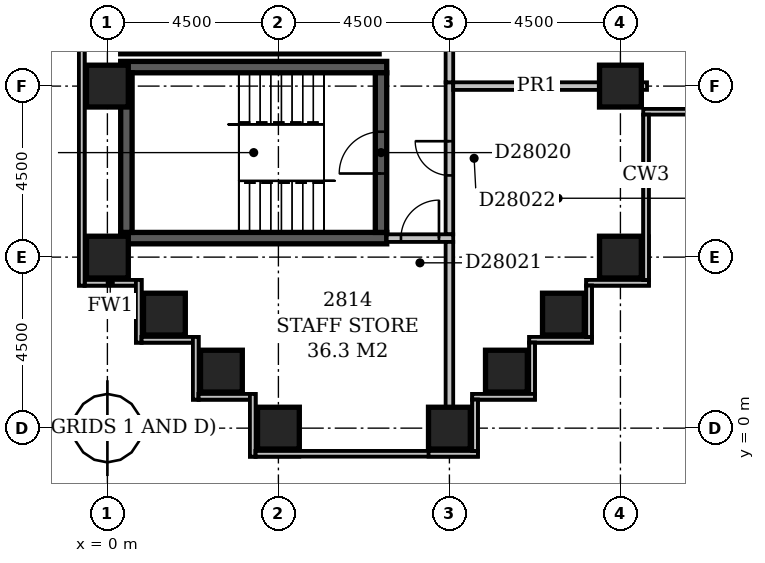
"""IFC4 building model, lengths in metres.
Left out: names, types, materials, properties, quantities, classifications, styles, units other than length and angle.
Written with IfcOpenShell. Run it as: python <this file> out.ifc"""

import sys

from ifc_helpers import new_model, si_unit, direction, frame, frame_2d, origin, origin_2d, place, context, subcontext, project, spatial, rectangle, extrude, element, fill, save


model = new_model("IFC4")
c1 = context("Model", 3, precision=1e-05, world=origin(), true_north=direction((0.0, 1.0)))
c2 = subcontext(c1, "Body", "Model", "MODEL_VIEW")
j1 = project(units=[si_unit("LENGTHUNIT", "METRE"), si_unit("PLANEANGLEUNIT", "RADIAN")], contexts=[c1])
p1 = place(None, origin())
s1 = spatial("IfcSite", under=j1, at=p1, CompositionType="ELEMENT")
p2 = place(p1, origin())
s2 = spatial("IfcBuilding", under=s1, at=p2, CompositionType="ELEMENT")
p3 = place(p2, frame((0.0, 0.0, 113.6)))
s3 = spatial("IfcBuildingStorey", under=s2, at=p3, CompositionType="ELEMENT", Elevation=113.6)
for number, where, z_axis, x_axis in (
    (1, (0.35, 5.0, -0.5), (0.0, 0.0, 1.0), (1.0, 0.0, 0.0)),
    (2, (0.35, 9.5, -0.5), (0.0, 0.0, 1.0), (1.0, 0.0, 0.0)),
):
    element("IfcWall", number, at=place(p3, frame(where, z_axis=z_axis, x_axis=x_axis)), inside=s3, PredefinedType="SHEAR", context=c2, shape_type="SweptSolid", body=[
        extrude(rectangle(XDim=7.0, YDim=0.3, at=frame_2d((3.5, 0.0))), origin(), (0.0, 0.0, 1.0), 6.2),
    ])
p4 = place(p3, frame((0.35, 10.0, -0.5), z_axis=(0.0, 0.0, 1.0), x_axis=(1.0, 0.0, 0.0)))
e3 = element("IfcWall", 3, at=p4, inside=s3, PredefinedType="SHEAR", context=c2, shape_type="SweptSolid", body=[
    extrude(rectangle(XDim=6.8, YDim=0.3, at=frame_2d((3.4, 0.0))), origin(), (0.0, 0.0, 1.0), 6.2),
])
p5 = place(p3, frame((0.5, 5.15, -0.5), z_axis=(0.0, 0.0, 1.0), x_axis=(0.0, 1.0, 0.0)))
e4 = element("IfcWall", 4, at=p5, inside=s3, PredefinedType="SHEAR", context=c2, shape_type="SweptSolid", body=[
    extrude(rectangle(XDim=4.2, YDim=0.3, at=frame_2d((2.1, 0.0))), origin(), (0.0, 0.0, 1.0), 6.2),
])
p6 = place(p3, frame((7.2, 5.15, -0.5), z_axis=(0.0, 0.0, 1.0), x_axis=(0.0, 1.0, 0.0)))
e5 = element("IfcWall", 5, at=p6, inside=s3, PredefinedType="SHEAR", context=c2, shape_type="SweptSolid", body=[
    extrude(rectangle(XDim=4.2, YDim=0.3, at=frame_2d((2.1, 0.0))), origin(), (0.0, 0.0, 1.0), 6.2),
])
p7 = place(p6, frame((1.55, 0.0, 0.5)))
e6 = element("IfcOpeningElement", 6, at=p7, cuts=e5, PredefinedType="OPENING", context=c2, shape_type="SweptSolid", body=[
    extrude(rectangle(XDim=1.1, YDim=2.1, at=frame_2d((0.55, 1.05))), frame((0.0, 0.162, 0.0), z_axis=(0.0, -1.0, 0.0), x_axis=(1.0, 0.0, 0.0)), (0.0, 0.0, 1.0), 0.324),
])
for number, where, z_axis, x_axis in (
    (7, (4.5, 0.0, -0.5), (0.0, 0.0, 1.0), (1.0, 0.0, 0.0)),
    (8, (9.0, 0.0, -0.5), (0.0, 0.0, 1.0), (1.0, 0.0, 0.0)),
    (9, (3.0, 1.5, -0.5), (0.0, 0.0, 1.0), (1.0, 0.0, 0.0)),
    (10, (10.5, 1.5, -0.5), (0.0, 0.0, 1.0), (1.0, 0.0, 0.0)),
    (11, (1.5, 3.0, -0.5), (0.0, 0.0, 1.0), (1.0, 0.0, 0.0)),
    (12, (12.0, 3.0, -0.5), (0.0, 0.0, 1.0), (1.0, 0.0, 0.0)),
    (13, (0.0, 4.5, -0.5), (0.0, 0.0, 1.0), (1.0, 0.0, 0.0)),
    (14, (13.5, 4.5, -0.5), (0.0, 0.0, 1.0), (1.0, 0.0, 0.0)),
    (15, (0.0, 9.0, -0.5), (0.0, 0.0, 1.0), (1.0, 0.0, 0.0)),
    (16, (13.5, 9.0, -0.5), (0.0, 0.0, 1.0), (1.0, 0.0, 0.0)),
):
    element("IfcColumn", number, at=place(p3, frame(where, z_axis=z_axis, x_axis=x_axis)), inside=s3, PredefinedType="COLUMN", context=c2, shape_type="SweptSolid", body=[
        extrude(rectangle(XDim=1.1, YDim=1.1, at=origin_2d()), origin(), (0.0, 0.0, 1.0), 6.2),
    ])
p8 = place(p3, frame((9.675, -0.6, 0.0), z_axis=(0.0, 0.0, 1.0), x_axis=(0.0, 1.0, 0.0)))
e17 = element("IfcWall", 17, at=p8, inside=s3, PredefinedType="STANDARD", context=c2, shape_type="SweptSolid", body=[
    extrude(rectangle(XDim=1.35, YDim=0.15, at=frame_2d((0.675, 0.0))), origin(), (0.0, 0.0, 1.0), 1.1),
])
p9 = place(p3, frame((9.6, 0.825, 0.0), z_axis=(0.0, 0.0, 1.0), x_axis=(1.0, 0.0, 0.0)))
e18 = element("IfcWall", 18, at=p9, inside=s3, PredefinedType="STANDARD", context=c2, shape_type="SweptSolid", body=[
    extrude(rectangle(XDim=1.65, YDim=0.15, at=frame_2d((0.825, 0.0))), origin(), (0.0, 0.0, 1.0), 1.1),
])
p10 = place(p3, frame((11.175, 0.9, 0.0), z_axis=(0.0, 0.0, 1.0), x_axis=(0.0, 1.0, 0.0)))
e19 = element("IfcWall", 19, at=p10, inside=s3, PredefinedType="STANDARD", context=c2, shape_type="SweptSolid", body=[
    extrude(rectangle(XDim=1.35, YDim=0.15, at=frame_2d((0.675, 0.0))), origin(), (0.0, 0.0, 1.0), 1.1),
])
p11 = place(p3, frame((11.1, 2.325, 0.0), z_axis=(0.0, 0.0, 1.0), x_axis=(1.0, 0.0, 0.0)))
e20 = element("IfcWall", 20, at=p11, inside=s3, PredefinedType="STANDARD", context=c2, shape_type="SweptSolid", body=[
    extrude(rectangle(XDim=1.65, YDim=0.15, at=frame_2d((0.825, 0.0))), origin(), (0.0, 0.0, 1.0), 1.1),
])
p12 = place(p3, frame((12.675, 2.4, 0.0), z_axis=(0.0, 0.0, 1.0), x_axis=(0.0, 1.0, 0.0)))
e21 = element("IfcWall", 21, at=p12, inside=s3, PredefinedType="STANDARD", context=c2, shape_type="SweptSolid", body=[
    extrude(rectangle(XDim=1.35, YDim=0.15, at=frame_2d((0.675, 0.0))), origin(), (0.0, 0.0, 1.0), 1.1),
])
p13 = place(p3, frame((12.6, 3.825, 0.0), z_axis=(0.0, 0.0, 1.0), x_axis=(1.0, 0.0, 0.0)))
e22 = element("IfcWall", 22, at=p13, inside=s3, PredefinedType="STANDARD", context=c2, shape_type="SweptSolid", body=[
    extrude(rectangle(XDim=1.65, YDim=0.15, at=frame_2d((0.825, 0.0))), origin(), (0.0, 0.0, 1.0), 1.1),
])
p14 = place(p3, frame((14.175, 3.9, 0.0), z_axis=(0.0, 0.0, 1.0), x_axis=(0.0, 1.0, 0.0)))
e23 = element("IfcWall", 23, at=p14, inside=s3, PredefinedType="STANDARD", context=c2, shape_type="SweptSolid", body=[
    extrude(rectangle(XDim=4.35, YDim=0.15, at=frame_2d((2.175, 0.0))), origin(), (0.0, 0.0, 1.0), 1.1),
])
p15 = place(p3, frame((14.1, 8.325, 0.0), z_axis=(0.0, 0.0, 1.0), x_axis=(1.0, 0.0, 0.0)))
e24 = element("IfcWall", 24, at=p15, inside=s3, PredefinedType="STANDARD", context=c2, shape_type="SweptSolid", body=[
    extrude(rectangle(XDim=4.65, YDim=0.15, at=frame_2d((2.325, 0.0))), origin(), (0.0, 0.0, 1.0), 1.1),
])
p16 = place(p3, frame((-0.675, 59.1, 0.0), z_axis=(0.0, 0.0, 1.0), x_axis=(0.0, -1.0, 0.0)))
e25 = element("IfcWall", 25, at=p16, inside=s3, PredefinedType="STANDARD", context=c2, shape_type="SweptSolid", body=[
    extrude(rectangle(XDim=55.35, YDim=0.15, at=frame_2d((27.675, 0.0))), origin(), (0.0, 0.0, 1.0), 1.1),
])
p17 = place(p3, frame((-0.6, 3.825, 0.0), z_axis=(0.0, 0.0, 1.0), x_axis=(1.0, 0.0, 0.0)))
e26 = element("IfcWall", 26, at=p17, inside=s3, PredefinedType="STANDARD", context=c2, shape_type="SweptSolid", body=[
    extrude(rectangle(XDim=1.35, YDim=0.15, at=frame_2d((0.675, 0.0))), origin(), (0.0, 0.0, 1.0), 1.1),
])
p18 = place(p3, frame((0.825, 3.9, 0.0), z_axis=(0.0, 0.0, 1.0), x_axis=(0.0, -1.0, 0.0)))
e27 = element("IfcWall", 27, at=p18, inside=s3, PredefinedType="STANDARD", context=c2, shape_type="SweptSolid", body=[
    extrude(rectangle(XDim=1.65, YDim=0.15, at=frame_2d((0.825, 0.0))), origin(), (0.0, 0.0, 1.0), 1.1),
])
p19 = place(p3, frame((0.9, 2.325, 0.0), z_axis=(0.0, 0.0, 1.0), x_axis=(1.0, 0.0, 0.0)))
e28 = element("IfcWall", 28, at=p19, inside=s3, PredefinedType="STANDARD", context=c2, shape_type="SweptSolid", body=[
    extrude(rectangle(XDim=1.35, YDim=0.15, at=frame_2d((0.675, 0.0))), origin(), (0.0, 0.0, 1.0), 1.1),
])
p20 = place(p3, frame((2.325, 2.4, 0.0), z_axis=(0.0, 0.0, 1.0), x_axis=(0.0, -1.0, 0.0)))
e29 = element("IfcWall", 29, at=p20, inside=s3, PredefinedType="STANDARD", context=c2, shape_type="SweptSolid", body=[
    extrude(rectangle(XDim=1.65, YDim=0.15, at=frame_2d((0.825, 0.0))), origin(), (0.0, 0.0, 1.0), 1.1),
])
p21 = place(p3, frame((2.4, 0.825, 0.0), z_axis=(0.0, 0.0, 1.0), x_axis=(1.0, 0.0, 0.0)))
e30 = element("IfcWall", 30, at=p21, inside=s3, PredefinedType="STANDARD", context=c2, shape_type="SweptSolid", body=[
    extrude(rectangle(XDim=1.35, YDim=0.15, at=frame_2d((0.675, 0.0))), origin(), (0.0, 0.0, 1.0), 1.1),
])
p22 = place(p3, frame((3.825, 0.9, 0.0), z_axis=(0.0, 0.0, 1.0), x_axis=(0.0, -1.0, 0.0)))
e31 = element("IfcWall", 31, at=p22, inside=s3, PredefinedType="STANDARD", context=c2, shape_type="SweptSolid", body=[
    extrude(rectangle(XDim=1.65, YDim=0.15, at=frame_2d((0.825, 0.0))), origin(), (0.0, 0.0, 1.0), 1.1),
])
p23 = place(p3, frame((3.9, -0.675, 0.0), z_axis=(0.0, 0.0, 1.0), x_axis=(1.0, 0.0, 0.0)))
e32 = element("IfcWall", 32, at=p23, inside=s3, PredefinedType="STANDARD", context=c2, shape_type="SweptSolid", body=[
    extrude(rectangle(XDim=5.85, YDim=0.15, at=frame_2d((2.925, 0.0))), origin(), (0.0, 0.0, 1.0), 1.1),
])
p24 = place(p3, frame((9.675, -0.6, 1.1), z_axis=(0.0, 0.0, 1.0), x_axis=(0.0, 1.0, 0.0)))
e33 = element("IfcWall", 33, at=p24, inside=s3, PredefinedType="STANDARD", context=c2, shape_type="SweptSolid", body=[
    extrude(rectangle(XDim=1.35, YDim=0.15, at=frame_2d((0.675, 0.0))), origin(), (0.0, 0.0, 1.0), 4.0),
])
p25 = place(p3, frame((9.6, 0.825, 1.1), z_axis=(0.0, 0.0, 1.0), x_axis=(1.0, 0.0, 0.0)))
e34 = element("IfcWall", 34, at=p25, inside=s3, PredefinedType="STANDARD", context=c2, shape_type="SweptSolid", body=[
    extrude(rectangle(XDim=1.65, YDim=0.15, at=frame_2d((0.825, 0.0))), origin(), (0.0, 0.0, 1.0), 4.0),
])
p26 = place(p3, frame((11.175, 0.9, 1.1), z_axis=(0.0, 0.0, 1.0), x_axis=(0.0, 1.0, 0.0)))
e35 = element("IfcWall", 35, at=p26, inside=s3, PredefinedType="STANDARD", context=c2, shape_type="SweptSolid", body=[
    extrude(rectangle(XDim=1.35, YDim=0.15, at=frame_2d((0.675, 0.0))), origin(), (0.0, 0.0, 1.0), 4.0),
])
p27 = place(p3, frame((11.1, 2.325, 1.1), z_axis=(0.0, 0.0, 1.0), x_axis=(1.0, 0.0, 0.0)))
e36 = element("IfcWall", 36, at=p27, inside=s3, PredefinedType="STANDARD", context=c2, shape_type="SweptSolid", body=[
    extrude(rectangle(XDim=1.65, YDim=0.15, at=frame_2d((0.825, 0.0))), origin(), (0.0, 0.0, 1.0), 4.0),
])
p28 = place(p3, frame((12.675, 2.4, 1.1), z_axis=(0.0, 0.0, 1.0), x_axis=(0.0, 1.0, 0.0)))
e37 = element("IfcWall", 37, at=p28, inside=s3, PredefinedType="STANDARD", context=c2, shape_type="SweptSolid", body=[
    extrude(rectangle(XDim=1.35, YDim=0.15, at=frame_2d((0.675, 0.0))), origin(), (0.0, 0.0, 1.0), 4.0),
])
p29 = place(p3, frame((12.6, 3.825, 1.1), z_axis=(0.0, 0.0, 1.0), x_axis=(1.0, 0.0, 0.0)))
e38 = element("IfcWall", 38, at=p29, inside=s3, PredefinedType="STANDARD", context=c2, shape_type="SweptSolid", body=[
    extrude(rectangle(XDim=1.65, YDim=0.15, at=frame_2d((0.825, 0.0))), origin(), (0.0, 0.0, 1.0), 4.0),
])
p30 = place(p3, frame((14.175, 3.9, 1.1), z_axis=(0.0, 0.0, 1.0), x_axis=(0.0, 1.0, 0.0)))
e39 = element("IfcWall", 39, at=p30, inside=s3, PredefinedType="STANDARD", context=c2, shape_type="SweptSolid", body=[
    extrude(rectangle(XDim=1.15, YDim=0.15, at=frame_2d((0.575, 0.0))), origin(), (0.0, 0.0, 1.0), 4.0),
])
p31 = place(p3, frame((-0.675, 59.1, 1.1), z_axis=(0.0, 0.0, 1.0), x_axis=(0.0, -1.0, 0.0)))
e40 = element("IfcWall", 40, at=p31, inside=s3, PredefinedType="STANDARD", context=c2, shape_type="SweptSolid", body=[
    extrude(rectangle(XDim=55.35, YDim=0.15, at=frame_2d((27.675, 0.0))), origin(), (0.0, 0.0, 1.0), 4.0),
])
p32 = place(p3, frame((-0.6, 3.825, 1.1), z_axis=(0.0, 0.0, 1.0), x_axis=(1.0, 0.0, 0.0)))
e41 = element("IfcWall", 41, at=p32, inside=s3, PredefinedType="STANDARD", context=c2, shape_type="SweptSolid", body=[
    extrude(rectangle(XDim=1.35, YDim=0.15, at=frame_2d((0.675, 0.0))), origin(), (0.0, 0.0, 1.0), 4.0),
])
p33 = place(p3, frame((0.825, 3.9, 1.1), z_axis=(0.0, 0.0, 1.0), x_axis=(0.0, -1.0, 0.0)))
e42 = element("IfcWall", 42, at=p33, inside=s3, PredefinedType="STANDARD", context=c2, shape_type="SweptSolid", body=[
    extrude(rectangle(XDim=1.65, YDim=0.15, at=frame_2d((0.825, 0.0))), origin(), (0.0, 0.0, 1.0), 4.0),
])
p34 = place(p3, frame((0.9, 2.325, 1.1), z_axis=(0.0, 0.0, 1.0), x_axis=(1.0, 0.0, 0.0)))
e43 = element("IfcWall", 43, at=p34, inside=s3, PredefinedType="STANDARD", context=c2, shape_type="SweptSolid", body=[
    extrude(rectangle(XDim=1.35, YDim=0.15, at=frame_2d((0.675, 0.0))), origin(), (0.0, 0.0, 1.0), 4.0),
])
p35 = place(p3, frame((2.325, 2.4, 1.1), z_axis=(0.0, 0.0, 1.0), x_axis=(0.0, -1.0, 0.0)))
e44 = element("IfcWall", 44, at=p35, inside=s3, PredefinedType="STANDARD", context=c2, shape_type="SweptSolid", body=[
    extrude(rectangle(XDim=1.65, YDim=0.15, at=frame_2d((0.825, 0.0))), origin(), (0.0, 0.0, 1.0), 4.0),
])
p36 = place(p3, frame((2.4, 0.825, 1.1), z_axis=(0.0, 0.0, 1.0), x_axis=(1.0, 0.0, 0.0)))
e45 = element("IfcWall", 45, at=p36, inside=s3, PredefinedType="STANDARD", context=c2, shape_type="SweptSolid", body=[
    extrude(rectangle(XDim=1.35, YDim=0.15, at=frame_2d((0.675, 0.0))), origin(), (0.0, 0.0, 1.0), 4.0),
])
p37 = place(p3, frame((3.825, 0.9, 1.1), z_axis=(0.0, 0.0, 1.0), x_axis=(0.0, -1.0, 0.0)))
e46 = element("IfcWall", 46, at=p37, inside=s3, PredefinedType="STANDARD", context=c2, shape_type="SweptSolid", body=[
    extrude(rectangle(XDim=1.65, YDim=0.15, at=frame_2d((0.825, 0.0))), origin(), (0.0, 0.0, 1.0), 4.0),
])
p38 = place(p3, frame((3.9, -0.675, 1.1), z_axis=(0.0, 0.0, 1.0), x_axis=(1.0, 0.0, 0.0)))
e47 = element("IfcWall", 47, at=p38, inside=s3, PredefinedType="STANDARD", context=c2, shape_type="SweptSolid", body=[
    extrude(rectangle(XDim=1.15, YDim=0.15, at=frame_2d((0.575, 0.0))), origin(), (0.0, 0.0, 1.0), 4.0),
])
p39 = place(p3, frame((8.45, -0.675, 1.1), z_axis=(0.0, 0.0, 1.0), x_axis=(1.0, 0.0, 0.0)))
e48 = element("IfcWall", 48, at=p39, inside=s3, PredefinedType="STANDARD", context=c2, shape_type="SweptSolid", body=[
    extrude(rectangle(XDim=1.3, YDim=0.15, at=frame_2d((0.65, 0.0))), origin(), (0.0, 0.0, 1.0), 4.0),
])
p40 = place(p3, frame((9.0, 0.0, 0.0), z_axis=(0.0, 0.0, 1.0), x_axis=(0.0, 1.0, 0.0)))
e49 = element("IfcWall", 49, at=p40, inside=s3, PredefinedType="PARTITIONING", context=c2, shape_type="SweptSolid", body=[
    extrude(rectangle(XDim=4.9, YDim=0.2, at=frame_2d((2.45, 0.0))), origin(), (0.0, 0.0, 1.0), 5.7),
])
p41 = place(p3, frame((7.35, 5.0, 0.0), z_axis=(0.0, 0.0, 1.0), x_axis=(1.0, 0.0, 0.0)))
e50 = element("IfcWall", 50, at=p41, inside=s3, PredefinedType="PARTITIONING", context=c2, shape_type="SweptSolid", body=[
    extrude(rectangle(XDim=1.75, YDim=0.2, at=frame_2d((0.875, 0.0))), origin(), (0.0, 0.0, 1.0), 5.7),
])
p42 = place(p41, frame((0.375, 0.0, 0.0)))
e51 = element("IfcOpeningElement", 51, at=p42, cuts=e50, PredefinedType="OPENING", context=c2, shape_type="SweptSolid", body=[
    extrude(rectangle(XDim=1.0, YDim=2.1, at=frame_2d((0.5, 1.05))), frame((0.0, 0.112, 0.0), z_axis=(0.0, -1.0, 0.0), x_axis=(1.0, 0.0, 0.0)), (0.0, 0.0, 1.0), 0.224),
])
p43 = place(p3, frame((9.0, 5.1, 0.0), z_axis=(0.0, 0.0, 1.0), x_axis=(0.0, 1.0, 0.0)))
e52 = element("IfcWall", 52, at=p43, inside=s3, PredefinedType="PARTITIONING", context=c2, shape_type="SweptSolid", body=[
    extrude(rectangle(XDim=4.0, YDim=0.2, at=frame_2d((2.0, 0.0))), origin(), (0.0, 0.0, 1.0), 5.7),
])
p44 = place(p43, frame((1.55, 0.0, 0.0)))
e53 = element("IfcOpeningElement", 53, at=p44, cuts=e52, PredefinedType="OPENING", context=c2, shape_type="SweptSolid", body=[
    extrude(rectangle(XDim=0.9, YDim=2.1, at=frame_2d((0.45, 1.05))), frame((0.0, 0.112, 0.0), z_axis=(0.0, -1.0, 0.0), x_axis=(1.0, 0.0, 0.0)), (0.0, 0.0, 1.0), 0.224),
])
p45 = place(p3, frame((9.0, 9.1, 0.0), z_axis=(0.0, 0.0, 1.0), x_axis=(0.0, 1.0, 0.0)))
e54 = element("IfcWall", 54, at=p45, inside=s3, PredefinedType="PARTITIONING", context=c2, shape_type="SweptSolid", body=[
    extrude(rectangle(XDim=9.0, YDim=0.2, at=frame_2d((4.5, 0.0))), origin(), (0.0, 0.0, 1.0), 5.7),
])
p46 = place(p45, frame((4.0, 0.0, 0.0)))
e55 = element("IfcOpeningElement", 55, at=p46, cuts=e54, PredefinedType="OPENING", context=c2, shape_type="SweptSolid", body=[
    extrude(rectangle(XDim=1.0, YDim=2.1, at=frame_2d((0.5, 1.05))), frame((0.0, 0.112, 0.0), z_axis=(0.0, -1.0, 0.0), x_axis=(1.0, 0.0, 0.0)), (0.0, 0.0, 1.0), 0.224),
])
p47 = place(p3, frame((13.5, 9.0, 0.0), z_axis=(0.0, 0.0, 1.0), x_axis=(-1.0, 0.0, 0.0)))
e56 = element("IfcWall", 56, at=p47, inside=s3, PredefinedType="PARTITIONING", context=c2, shape_type="SweptSolid", body=[
    extrude(rectangle(XDim=4.4, YDim=0.2, at=frame_2d((2.2, 0.0))), origin(), (0.0, 0.0, 1.0), 5.7),
])
p48 = place(p3, frame((14.2, 9.0, 0.0), z_axis=(0.0, 0.0, 1.0), x_axis=(-1.0, 0.0, 0.0)))
e57 = element("IfcWall", 57, at=p48, inside=s3, PredefinedType="PARTITIONING", context=c2, shape_type="SweptSolid", body=[
    extrude(rectangle(XDim=0.7, YDim=0.2, at=frame_2d((0.35, 0.0))), origin(), (0.0, 0.0, 1.0), 5.1),
])
p49 = place(p7, origin())
e58 = element("IfcDoor", 58, at=p49, inside=s3, OperationType="SINGLE_SWING_LEFT", PredefinedType="DOOR", context=c2, shape_type="SweptSolid", body=[
    extrude(rectangle(XDim=1.1, YDim=2.1, at=frame_2d((0.55, 1.05))), frame((0.0, 0.025, 0.0), z_axis=(0.0, -1.0, 0.0), x_axis=(1.0, 0.0, 0.0)), (0.0, 0.0, 1.0), 0.05),
])
fill(e6, e58)
p50 = place(p42, frame((1.0, 0.0, 0.0), z_axis=(0.0, 0.0, 1.0), x_axis=(-1.0, 0.0, 0.0)))
e59 = element("IfcDoor", 59, at=p50, inside=s3, OperationType="SINGLE_SWING_LEFT", PredefinedType="DOOR", context=c2, shape_type="SweptSolid", body=[
    extrude(rectangle(XDim=1.0, YDim=2.1, at=frame_2d((0.5, 1.05))), frame((0.0, 0.025, 0.0), z_axis=(0.0, -1.0, 0.0), x_axis=(1.0, 0.0, 0.0)), (0.0, 0.0, 1.0), 0.05),
])
fill(e51, e59)
p51 = place(p44, frame((0.9, 0.0, 0.0), z_axis=(0.0, 0.0, 1.0), x_axis=(-1.0, 0.0, 0.0)))
e60 = element("IfcDoor", 60, at=p51, inside=s3, OperationType="SINGLE_SWING_LEFT", PredefinedType="DOOR", context=c2, shape_type="SweptSolid", body=[
    extrude(rectangle(XDim=0.9, YDim=2.1, at=frame_2d((0.45, 1.05))), frame((0.0, 0.025, 0.0), z_axis=(0.0, -1.0, 0.0), x_axis=(1.0, 0.0, 0.0)), (0.0, 0.0, 1.0), 0.05),
])
fill(e53, e60)
save(model, sys.argv[1])
